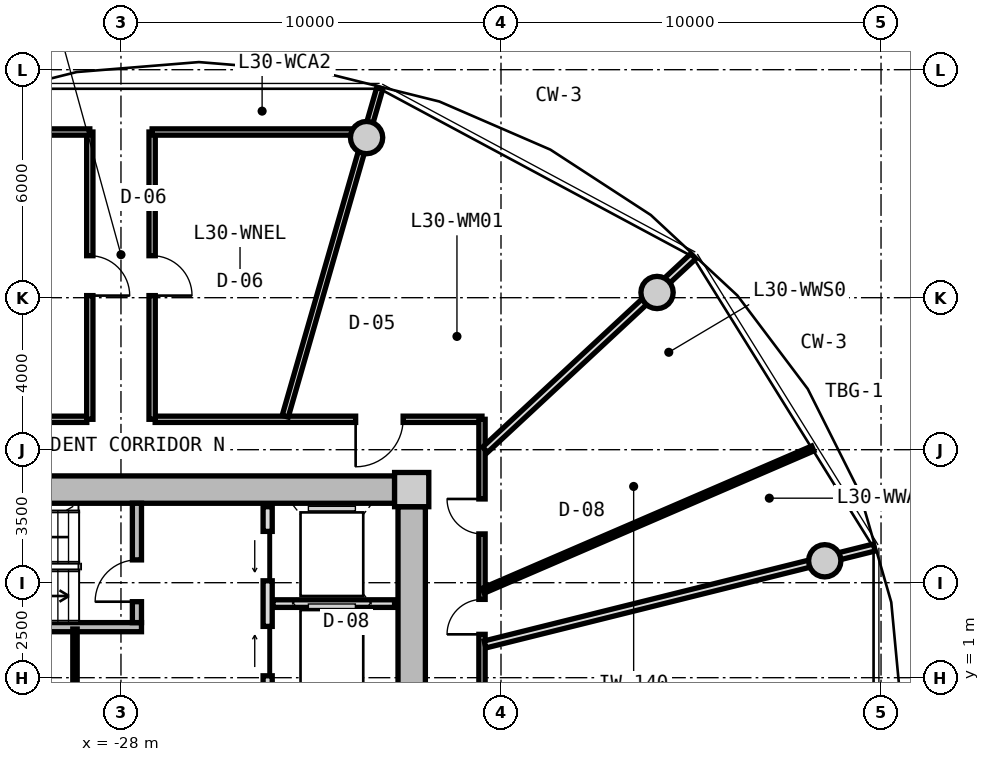
"""IFC4 building model, lengths in metres.
Left out: names, types, materials, properties, quantities, classifications, styles, units other than length and angle.
Written with IfcOpenShell. Run it as: python <this file> out.ifc"""

import sys

from ifc_helpers import new_model, si_unit, direction, frame, frame_2d, origin, origin_2d, place, context, subcontext, project, spatial, rectangle, circle, extrude, source, transform, mapped, element, fill, save


model = new_model("IFC4")
c1 = context("Model", 3, precision=1e-05, world=origin(), true_north=direction((0.0, 1.0)))
c2 = subcontext(c1, "Body", "Model", "MODEL_VIEW")
j1 = project(units=[si_unit("LENGTHUNIT", "METRE"), si_unit("PLANEANGLEUNIT", "RADIAN")], contexts=[c1])
p1 = place(None, origin())
s1 = spatial("IfcSite", under=j1, at=p1, CompositionType="ELEMENT")
p2 = place(p1, origin())
s2 = spatial("IfcBuilding", under=s1, at=p2, CompositionType="ELEMENT")
p3 = place(p2, frame((0.0, 0.0, 99.3)))
s3 = spatial("IfcBuildingStorey", under=s2, at=p3, CompositionType="ELEMENT", Elevation=99.3)
m1 = source(origin(), c2, "Body", "SweptSolid", [
    extrude(rectangle(XDim=0.9, YDim=0.9, at=origin_2d()), origin(), (0.0, 0.0, 1.0), 3.05),
])
p4 = place(p3, frame((-20.35, 5.95, 0.0), z_axis=(0.0, 0.0, 1.0), x_axis=(1.0, 0.0, 0.0)))
e1 = element("IfcColumn", 1, at=p4, inside=s3, PredefinedType="COLUMN", context=c2, shape_type="MappedRepresentation", body=[
    mapped(m1, transform((0.0, 0.0, 0.0), x_axis=(1.0, 0.0, 0.0), y_axis=(0.0, 1.0, 0.0), z_axis=(0.0, 0.0, 1.0), scale=1.0)),
])
m2 = source(origin(), c2, "Body", "SweptSolid", [
    extrude(rectangle(XDim=14.4, YDim=0.72, at=frame_2d((7.2, 0.0))), origin(), (0.0, 0.0, 1.0), 2.79),
])
p5 = place(p3, frame((-35.2, 5.95, 0.0), z_axis=(0.0, 0.0, 1.0), x_axis=(1.0, 0.0, 0.0)))
e2 = element("IfcWall", 2, at=p5, inside=s3, PredefinedType="SHEAR", context=c2, shape_type="MappedRepresentation", body=[
    mapped(m2, transform((0.0, 0.0, 0.0), x_axis=(1.0, 0.0, 0.0), y_axis=(0.0, 1.0, 0.0), z_axis=(0.0, 0.0, 1.0), scale=1.0)),
])
m3 = source(origin(), c2, "Body", "SweptSolid", [
    extrude(rectangle(XDim=11.0, YDim=0.72, at=frame_2d((5.5, 0.0))), origin(), (0.0, 0.0, 1.0), 2.79),
])
p6 = place(p3, frame((-20.35, 5.5, 0.0), z_axis=(0.0, 0.0, 1.0), x_axis=(0.0, -1.0, 0.0)))
e3 = element("IfcWall", 3, at=p6, inside=s3, PredefinedType="SHEAR", context=c2, shape_type="MappedRepresentation", body=[
    mapped(m3, transform((0.0, 0.0, 0.0), x_axis=(1.0, 0.0, 0.0), y_axis=(0.0, 1.0, 0.0), z_axis=(0.0, 0.0, 1.0), scale=1.0)),
])
p7 = place(p6, frame((5.65, 0.0, 0.0)))
e4 = element("IfcOpeningElement", 4, at=p7, cuts=e3, PredefinedType="OPENING", context=c2, shape_type="SweptSolid", body=[
    extrude(rectangle(XDim=1.2, YDim=2.15, at=frame_2d((0.6, 1.075))), frame((0.0, 0.37, 0.0), z_axis=(0.0, -1.0, 0.0), x_axis=(1.0, 0.0, 0.0)), (0.0, 0.0, 1.0), 0.74),
])
m4 = source(origin(), c2, "Body", "SweptSolid", [
    extrude(circle(Radius=0.425, at=origin_2d()), origin(), (0.0, 0.0, 1.0), 3.05),
])
for number, where, z_axis, x_axis in (
    (5, (-9.481, 4.076, 0.0), (0.0, 0.0, 1.0), (1.0, 0.0, 0.0)),
    (6, (-13.894, 11.137, 0.0), (0.0, 0.0, 1.0), (1.0, 0.0, 0.0)),
    (7, (-21.537, 15.213, 0.0), (0.0, 0.0, 1.0), (1.0, 0.0, 0.0)),
):
    element("IfcColumn", number, at=place(p3, frame(where, z_axis=z_axis, x_axis=x_axis)), inside=s3, PredefinedType="COLUMN", context=c2, shape_type="MappedRepresentation", body=[
        mapped(m4, transform((0.0, 0.0, 0.0), x_axis=(1.0, 0.0, 0.0), y_axis=(0.0, 1.0, 0.0), z_axis=(0.0, 0.0, 1.0), scale=1.0)),
    ])
m5 = source(origin(), c2, "Body", "SweptSolid", [
    extrude(rectangle(XDim=7.83, YDim=0.24, at=frame_2d((3.915, 0.0))), origin(), (0.0, 0.0, 1.0), 2.79),
])
p8 = place(p3, frame((-35.29, 2.33, 0.0), z_axis=(0.0, 0.0, 1.0), x_axis=(1.0, 0.0, 0.0)))
e8 = element("IfcWall", 8, at=p8, inside=s3, PredefinedType="PARTITIONING", context=c2, shape_type="MappedRepresentation", body=[
    mapped(m5, transform((0.0, 0.0, 0.0), x_axis=(1.0, 0.0, 0.0), y_axis=(0.0, 1.0, 0.0), z_axis=(0.0, 0.0, 1.0), scale=1.0)),
])
m6 = source(origin(), c2, "Body", "SweptSolid", [
    extrude(rectangle(XDim=3.14, YDim=0.24, at=frame_2d((1.57, 0.0))), origin(), (0.0, 0.0, 1.0), 2.79),
])
p9 = place(p3, frame((-27.58, 2.45, 0.0), z_axis=(0.0, 0.0, 1.0), x_axis=(0.0, 1.0, 0.0)))
e9 = element("IfcWall", 9, at=p9, inside=s3, PredefinedType="PARTITIONING", context=c2, shape_type="MappedRepresentation", body=[
    mapped(m6, transform((0.0, 0.0, 0.0), x_axis=(1.0, 0.0, 0.0), y_axis=(0.0, 1.0, 0.0), z_axis=(0.0, 0.0, 1.0), scale=1.0)),
])
p10 = place(p9, frame((0.55, 0.0, 0.0)))
e10 = element("IfcOpeningElement", 10, at=p10, cuts=e9, PredefinedType="OPENING", context=c2, shape_type="SweptSolid", body=[
    extrude(rectangle(XDim=1.1, YDim=2.15, at=frame_2d((0.55, 1.075))), frame((0.0, 0.13, 0.0), z_axis=(0.0, -1.0, 0.0), x_axis=(1.0, 0.0, 0.0)), (0.0, 0.0, 1.0), 0.26),
])
m7 = source(origin(), c2, "Body", "SweptSolid", [
    extrude(rectangle(XDim=5.0, YDim=0.24, at=frame_2d((2.5, 0.0))), origin(), (0.0, 0.0, 1.0), 2.775),
])
p11 = place(p3, frame((-24.14, 0.5, 0.0), z_axis=(0.0, 0.0, 1.0), x_axis=(0.0, 1.0, 0.0)))
e11 = element("IfcWall", 11, at=p11, inside=s3, PredefinedType="PARTITIONING", context=c2, shape_type="MappedRepresentation", body=[
    mapped(m7, transform((0.0, 0.0, 0.0), x_axis=(1.0, 0.0, 0.0), y_axis=(0.0, 1.0, 0.0), z_axis=(0.0, 0.0, 1.0), scale=1.0)),
])
p12 = place(p11, frame((3.05, 0.0, 0.0)))
e12 = element("IfcOpeningElement", 12, at=p12, cuts=e11, PredefinedType="OPENING", context=c2, shape_type="SweptSolid", body=[
    extrude(rectangle(XDim=1.3, YDim=2.2, at=frame_2d((0.65, 1.1))), frame((0.0, 0.13, 0.0), z_axis=(0.0, -1.0, 0.0), x_axis=(1.0, 0.0, 0.0)), (0.0, 0.0, 1.0), 0.26),
])
p13 = place(p11, frame((0.55, 0.0, 0.0)))
e13 = element("IfcOpeningElement", 13, at=p13, cuts=e11, PredefinedType="OPENING", context=c2, shape_type="SweptSolid", body=[
    extrude(rectangle(XDim=1.3, YDim=2.2, at=frame_2d((0.65, 1.1))), frame((0.0, 0.13, 0.0), z_axis=(0.0, -1.0, 0.0), x_axis=(1.0, 0.0, 0.0)), (0.0, 0.0, 1.0), 0.26),
])
m8 = source(origin(), c2, "Body", "SweptSolid", [
    extrude(rectangle(XDim=3.2, YDim=0.2, at=frame_2d((1.6, 0.0))), origin(), (0.0, 0.0, 1.0), 2.775),
])
p14 = place(p3, frame((-24.0, 2.95, 0.0), z_axis=(0.0, 0.0, 1.0), x_axis=(1.0, 0.0, 0.0)))
e14 = element("IfcWall", 14, at=p14, inside=s3, PredefinedType="PARTITIONING", context=c2, shape_type="MappedRepresentation", body=[
    mapped(m8, transform((0.0, 0.0, 0.0), x_axis=(1.0, 0.0, 0.0), y_axis=(0.0, 1.0, 0.0), z_axis=(0.0, 0.0, 1.0), scale=1.0)),
])
m9 = source(origin(), c2, "Body", "SweptSolid", [
    extrude(rectangle(XDim=2.33, YDim=0.115, at=frame_2d((1.165, 0.0))), origin(), (0.0, 0.0, 1.0), 2.775),
])
p15 = place(p3, frame((-29.21, -0.05, 0.0), z_axis=(0.0, 0.0, 1.0), x_axis=(0.0, 1.0, 0.0)))
e15 = element("IfcWall", 15, at=p15, inside=s3, PredefinedType="PARTITIONING", context=c2, shape_type="MappedRepresentation", body=[
    mapped(m9, transform((0.0, 0.0, 0.0), x_axis=(1.0, 0.0, 0.0), y_axis=(0.0, 1.0, 0.0), z_axis=(0.0, 0.0, 1.0), scale=1.0)),
])
m10 = source(origin(), c2, "Body", "SweptSolid", [
    extrude(rectangle(XDim=8.6, YDim=0.165, at=frame_2d((4.3, 0.0))), origin(), (0.0, 0.0, 1.0), 2.775),
])
p16 = place(p3, frame((-37.5, 7.8, 0.0), z_axis=(0.0, 0.0, 1.0), x_axis=(1.0, 0.0, 0.0)))
e16 = element("IfcWall", 16, at=p16, inside=s3, PredefinedType="PARTITIONING", context=c2, shape_type="MappedRepresentation", body=[
    mapped(m10, transform((0.0, 0.0, 0.0), x_axis=(1.0, 0.0, 0.0), y_axis=(0.0, 1.0, 0.0), z_axis=(0.0, 0.0, 1.0), scale=1.0)),
])
p17 = place(p3, frame((-27.1, 7.8, 0.0), z_axis=(0.0, 0.0, 1.0), x_axis=(1.0, 0.0, 0.0)))
e17 = element("IfcWall", 17, at=p17, inside=s3, PredefinedType="PARTITIONING", context=c2, shape_type="MappedRepresentation", body=[
    mapped(m10, transform((0.0, 0.0, 0.0), x_axis=(1.0, 0.0, 0.0), y_axis=(0.0, 1.0, 0.0), z_axis=(0.0, 0.0, 1.0), scale=1.0)),
])
p18 = place(p17, frame((5.275, 0.0, 0.0)))
e18 = element("IfcOpeningElement", 18, at=p18, cuts=e17, PredefinedType="OPENING", context=c2, shape_type="SweptSolid", body=[
    extrude(rectangle(XDim=1.25, YDim=2.2, at=frame_2d((0.625, 1.1))), frame((0.0, 0.093, 0.0), z_axis=(0.0, -1.0, 0.0), x_axis=(1.0, 0.0, 0.0)), (0.0, 0.0, 1.0), 0.185),
])
m11 = source(origin(), c2, "Body", "SweptSolid", [
    extrude(rectangle(XDim=15.6, YDim=0.165, at=frame_2d((7.8, 0.0))), origin(), (0.0, 0.0, 1.0), 2.775),
])
p19 = place(p3, frame((-18.5, 7.8, 0.0), z_axis=(0.0, 0.0, 1.0), x_axis=(0.0, -1.0, 0.0)))
e19 = element("IfcWall", 19, at=p19, inside=s3, PredefinedType="PARTITIONING", context=c2, shape_type="MappedRepresentation", body=[
    mapped(m11, transform((0.0, 0.0, 0.0), x_axis=(1.0, 0.0, 0.0), y_axis=(0.0, 1.0, 0.0), z_axis=(0.0, 0.0, 1.0), scale=1.0)),
])
p20 = place(p19, frame((9.734, 0.0, 0.0)))
e20 = element("IfcOpeningElement", 20, at=p20, cuts=e19, PredefinedType="OPENING", context=c2, shape_type="SweptSolid", body=[
    extrude(rectangle(XDim=1.25, YDim=2.2, at=frame_2d((0.625, 1.1))), frame((0.0, 0.093, 0.0), z_axis=(0.0, -1.0, 0.0), x_axis=(1.0, 0.0, 0.0)), (0.0, 0.0, 1.0), 0.185),
])
p21 = place(p19, frame((4.739, 0.0, 0.0)))
e21 = element("IfcOpeningElement", 21, at=p21, cuts=e19, PredefinedType="OPENING", context=c2, shape_type="SweptSolid", body=[
    extrude(rectangle(XDim=0.92, YDim=2.1, at=frame_2d((0.46, 1.05))), frame((0.0, 0.093, 0.0), z_axis=(0.0, -1.0, 0.0), x_axis=(1.0, 0.0, 0.0)), (0.0, 0.0, 1.0), 0.185),
])
p22 = place(p19, frame((2.096, 0.0, 0.0)))
e22 = element("IfcOpeningElement", 22, at=p22, cuts=e19, PredefinedType="OPENING", context=c2, shape_type="SweptSolid", body=[
    extrude(rectangle(XDim=0.92, YDim=2.1, at=frame_2d((0.46, 1.05))), frame((0.0, 0.093, 0.0), z_axis=(0.0, -1.0, 0.0), x_axis=(1.0, 0.0, 0.0)), (0.0, 0.0, 1.0), 0.185),
])
m12 = source(origin(), c2, "Body", "SweptSolid", [
    extrude(rectangle(XDim=8.989, YDim=0.165, at=frame_2d((4.495, 0.0))), origin(), (0.0, 0.0, 1.0), 2.275),
])
p23 = place(p3, frame((-23.678, 7.88, 0.0), z_axis=(0.0, 0.0, 1.0), x_axis=(0.27702323008, 0.960863221274, 0.0)))
e23 = element("IfcWall", 23, at=p23, inside=s3, PredefinedType="PARTITIONING", context=c2, shape_type="MappedRepresentation", body=[
    mapped(m12, transform((0.0, 0.0, 0.0), x_axis=(1.0, 0.0, 0.0), y_axis=(0.0, 1.0, 0.0), z_axis=(0.0, 0.0, 1.0), scale=1.0)),
])
m13 = source(origin(), c2, "Body", "SweptSolid", [
    extrude(rectangle(XDim=7.56, YDim=0.165, at=frame_2d((3.78, 0.0))), origin(), (0.0, 0.0, 1.0), 2.775),
])
p24 = place(p3, frame((-28.82, 7.8, 0.0), z_axis=(0.0, 0.0, 1.0), x_axis=(0.0, 1.0, 0.0)))
e24 = element("IfcWall", 24, at=p24, inside=s3, PredefinedType="PARTITIONING", context=c2, shape_type="MappedRepresentation", body=[
    mapped(m13, transform((0.0, 0.0, 0.0), x_axis=(1.0, 0.0, 0.0), y_axis=(0.0, 1.0, 0.0), z_axis=(0.0, 0.0, 1.0), scale=1.0)),
])
p25 = place(p24, frame((3.255, 0.0, 0.0)))
e25 = element("IfcOpeningElement", 25, at=p25, cuts=e24, PredefinedType="OPENING", context=c2, shape_type="SweptSolid", body=[
    extrude(rectangle(XDim=1.05, YDim=2.15, at=frame_2d((0.525, 1.075))), frame((0.0, 0.093, 0.0), z_axis=(0.0, -1.0, 0.0), x_axis=(1.0, 0.0, 0.0)), (0.0, 0.0, 1.0), 0.185),
])
m14 = source(origin(), c2, "Body", "SweptSolid", [
    extrude(rectangle(XDim=4.307, YDim=0.165, at=frame_2d((2.153, 0.0))), origin(), (0.0, 0.0, 1.0), 2.275),
])
p26 = place(p3, frame((-33.127, 15.36, 0.0), z_axis=(0.0, 0.0, 1.0), x_axis=(1.0, 0.0, 0.0)))
e26 = element("IfcWall", 26, at=p26, inside=s3, PredefinedType="PARTITIONING", context=c2, shape_type="MappedRepresentation", body=[
    mapped(m14, transform((0.0, 0.0, 0.0), x_axis=(1.0, 0.0, 0.0), y_axis=(0.0, 1.0, 0.0), z_axis=(0.0, 0.0, 1.0), scale=1.0)),
])
p27 = place(p3, frame((-27.18, 7.8, 0.0), z_axis=(0.0, 0.0, 1.0), x_axis=(0.0, 1.0, 0.0)))
e27 = element("IfcWall", 27, at=p27, inside=s3, PredefinedType="PARTITIONING", context=c2, shape_type="MappedRepresentation", body=[
    mapped(m13, transform((0.0, 0.0, 0.0), x_axis=(1.0, 0.0, 0.0), y_axis=(0.0, 1.0, 0.0), z_axis=(0.0, 0.0, 1.0), scale=1.0)),
])
p28 = place(p27, frame((3.255, 0.0, 0.0)))
e28 = element("IfcOpeningElement", 28, at=p28, cuts=e27, PredefinedType="OPENING", context=c2, shape_type="SweptSolid", body=[
    extrude(rectangle(XDim=1.05, YDim=2.15, at=frame_2d((0.525, 1.075))), frame((0.0, 0.093, 0.0), z_axis=(0.0, -1.0, 0.0), x_axis=(1.0, 0.0, 0.0)), (0.0, 0.0, 1.0), 0.185),
])
m15 = source(origin(), c2, "Body", "SweptSolid", [
    extrude(rectangle(XDim=5.814, YDim=0.165, at=frame_2d((2.907, 0.0))), origin(), (0.0, 0.0, 1.0), 2.275),
])
p29 = place(p3, frame((-27.18, 15.36, 0.0), z_axis=(0.0, 0.0, 1.0), x_axis=(1.0, 0.0, 0.0)))
e29 = element("IfcWall", 29, at=p29, inside=s3, PredefinedType="PARTITIONING", context=c2, shape_type="MappedRepresentation", body=[
    mapped(m15, transform((0.0, 0.0, 0.0), x_axis=(1.0, 0.0, 0.0), y_axis=(0.0, 1.0, 0.0), z_axis=(0.0, 0.0, 1.0), scale=1.0)),
])
m16 = source(origin(), c2, "Body", "SweptSolid", [
    extrude(rectangle(XDim=10.556, YDim=0.19, at=frame_2d((5.278, 0.0))), origin(), (0.0, 0.0, 1.0), 2.275),
])
p30 = place(p3, frame((-18.42, 1.875, 0.0), z_axis=(0.0, 0.0, 1.0), x_axis=(0.970363857851, 0.241648470667, 0.0)))
e30 = element("IfcWall", 30, at=p30, inside=s3, PredefinedType="PARTITIONING", context=c2, shape_type="MappedRepresentation", body=[
    mapped(m16, transform((0.0, 0.0, 0.0), x_axis=(1.0, 0.0, 0.0), y_axis=(0.0, 1.0, 0.0), z_axis=(0.0, 0.0, 1.0), scale=1.0)),
])
m17 = source(origin(), c2, "Body", "SweptSolid", [
    extrude(rectangle(XDim=7.482, YDim=0.19, at=frame_2d((3.741, 0.0))), origin(), (0.0, 0.0, 1.0), 2.275),
])
p31 = place(p3, frame((-18.42, 6.998, 0.0), z_axis=(0.0, 0.0, 1.0), x_axis=(0.732508698043, 0.680757671489, 0.0)))
e31 = element("IfcWall", 31, at=p31, inside=s3, PredefinedType="PARTITIONING", context=c2, shape_type="MappedRepresentation", body=[
    mapped(m17, transform((0.0, 0.0, 0.0), x_axis=(1.0, 0.0, 0.0), y_axis=(0.0, 1.0, 0.0), z_axis=(0.0, 0.0, 1.0), scale=1.0)),
])
m18 = source(origin(), c2, "Body", "SweptSolid", [
    extrude(rectangle(XDim=9.447, YDim=0.14, at=frame_2d((4.724, 0.0))), origin(), (0.0, 0.0, 1.0), 2.775),
])
p32 = place(p3, frame((-18.47, 3.289, 0.0), z_axis=(0.0, 0.0, 1.0), x_axis=(0.918162367414, 0.396204324894, 0.0)))
e32 = element("IfcWall", 32, at=p32, inside=s3, PredefinedType="PARTITIONING", context=c2, shape_type="MappedRepresentation", body=[
    mapped(m18, transform((0.0, 0.0, 0.0), x_axis=(1.0, 0.0, 0.0), y_axis=(0.0, 1.0, 0.0), z_axis=(0.0, 0.0, 1.0), scale=1.0)),
])
m19 = source(origin(), c2, "Body", "SweptSolid", [
    extrude(rectangle(XDim=1.1, YDim=2.15, at=frame_2d((0.55, 1.075))), frame((0.0, 0.025, 0.0), z_axis=(0.0, -1.0, 0.0), x_axis=(1.0, 0.0, 0.0)), (0.0, 0.0, 1.0), 0.05),
])
p33 = place(p10, origin())
e33 = element("IfcDoor", 33, at=p33, inside=s3, OperationType="SINGLE_SWING_LEFT", PredefinedType="DOOR", context=c2, shape_type="MappedRepresentation", body=[
    mapped(m19, transform((0.0, 0.0, 0.0), x_axis=(1.0, 0.0, 0.0), y_axis=(0.0, 1.0, 0.0), z_axis=(0.0, 0.0, 1.0), scale=1.0)),
])
fill(e10, e33)
m20 = source(origin(), c2, "Body", "SweptSolid", [
    extrude(rectangle(XDim=1.3, YDim=2.2, at=frame_2d((0.65, 1.1))), frame((0.0, 0.025, 0.0), z_axis=(0.0, -1.0, 0.0), x_axis=(1.0, 0.0, 0.0)), (0.0, 0.0, 1.0), 0.05),
])
p34 = place(p12, origin())
e34 = element("IfcDoor", 34, at=p34, inside=s3, OperationType="SLIDING_TO_LEFT", PredefinedType="DOOR", context=c2, shape_type="MappedRepresentation", body=[
    mapped(m20, transform((0.0, 0.0, 0.0), x_axis=(1.0, 0.0, 0.0), y_axis=(0.0, 1.0, 0.0), z_axis=(0.0, 0.0, 1.0), scale=1.0)),
])
fill(e12, e34)
p35 = place(p13, origin())
e35 = element("IfcDoor", 35, at=p35, inside=s3, OperationType="SLIDING_TO_RIGHT", PredefinedType="DOOR", context=c2, shape_type="MappedRepresentation", body=[
    mapped(m20, transform((0.0, 0.0, 0.0), x_axis=(1.0, 0.0, 0.0), y_axis=(0.0, 1.0, 0.0), z_axis=(0.0, 0.0, 1.0), scale=1.0)),
])
fill(e13, e35)
m21 = source(origin(), c2, "Body", "SweptSolid", [
    extrude(rectangle(XDim=1.05, YDim=2.15, at=frame_2d((0.525, 1.075))), frame((0.0, 0.025, 0.0), z_axis=(0.0, -1.0, 0.0), x_axis=(1.0, 0.0, 0.0)), (0.0, 0.0, 1.0), 0.05),
])
p36 = place(p25, frame((1.05, 0.0, 0.0), z_axis=(0.0, 0.0, 1.0), x_axis=(-1.0, 0.0, 0.0)))
e36 = element("IfcDoor", 36, at=p36, inside=s3, OperationType="SINGLE_SWING_RIGHT", PredefinedType="DOOR", context=c2, shape_type="MappedRepresentation", body=[
    mapped(m21, transform((0.0, 0.0, 0.0), x_axis=(1.0, 0.0, 0.0), y_axis=(0.0, 1.0, 0.0), z_axis=(0.0, 0.0, 1.0), scale=1.0)),
])
fill(e25, e36)
p37 = place(p28, frame((1.05, 0.0, 0.0), z_axis=(0.0, 0.0, 1.0), x_axis=(-1.0, 0.0, 0.0)))
e37 = element("IfcDoor", 37, at=p37, inside=s3, OperationType="SINGLE_SWING_RIGHT", PredefinedType="DOOR", context=c2, shape_type="MappedRepresentation", body=[
    mapped(m21, transform((0.0, 0.0, 0.0), x_axis=(1.0, 0.0, 0.0), y_axis=(0.0, 1.0, 0.0), z_axis=(0.0, 0.0, 1.0), scale=1.0)),
])
fill(e28, e37)
m22 = source(origin(), c2, "Body", "SweptSolid", [
    extrude(rectangle(XDim=0.92, YDim=2.1, at=frame_2d((0.46, 1.05))), frame((0.0, 0.025, 0.0), z_axis=(0.0, -1.0, 0.0), x_axis=(1.0, 0.0, 0.0)), (0.0, 0.0, 1.0), 0.05),
])
p38 = place(p21, frame((0.92, 0.0, 0.0), z_axis=(0.0, 0.0, 1.0), x_axis=(-1.0, 0.0, 0.0)))
e38 = element("IfcDoor", 38, at=p38, inside=s3, OperationType="SINGLE_SWING_LEFT", PredefinedType="DOOR", context=c2, shape_type="MappedRepresentation", body=[
    mapped(m22, transform((0.0, 0.0, 0.0), x_axis=(1.0, 0.0, 0.0), y_axis=(0.0, 1.0, 0.0), z_axis=(0.0, 0.0, 1.0), scale=1.0)),
])
fill(e21, e38)
p39 = place(p22, frame((0.92, 0.0, 0.0), z_axis=(0.0, 0.0, 1.0), x_axis=(-1.0, 0.0, 0.0)))
e39 = element("IfcDoor", 39, at=p39, inside=s3, OperationType="SINGLE_SWING_RIGHT", PredefinedType="DOOR", context=c2, shape_type="MappedRepresentation", body=[
    mapped(m22, transform((0.0, 0.0, 0.0), x_axis=(1.0, 0.0, 0.0), y_axis=(0.0, 1.0, 0.0), z_axis=(0.0, 0.0, 1.0), scale=1.0)),
])
fill(e22, e39)
m23 = source(origin(), c2, "Body", "SweptSolid", [
    extrude(rectangle(XDim=1.25, YDim=2.2, at=frame_2d((0.625, 1.1))), frame((0.0, 0.025, 0.0), z_axis=(0.0, -1.0, 0.0), x_axis=(1.0, 0.0, 0.0)), (0.0, 0.0, 1.0), 0.05),
])
p40 = place(p18, frame((1.25, 0.0, 0.0), z_axis=(0.0, 0.0, 1.0), x_axis=(-1.0, 0.0, 0.0)))
e40 = element("IfcDoor", 40, at=p40, inside=s3, OperationType="SINGLE_SWING_RIGHT", PredefinedType="DOOR", context=c2, shape_type="MappedRepresentation", body=[
    mapped(m23, transform((0.0, 0.0, 0.0), x_axis=(1.0, 0.0, 0.0), y_axis=(0.0, 1.0, 0.0), z_axis=(0.0, 0.0, 1.0), scale=1.0)),
])
fill(e18, e40)
save(model, sys.argv[1])
